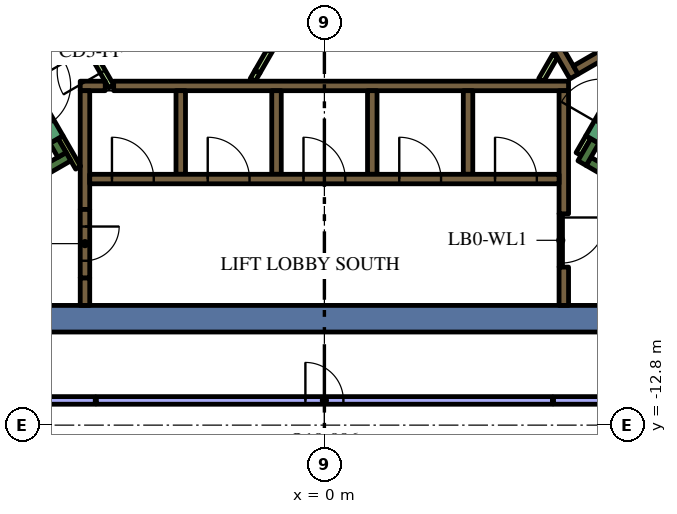
"""IFC4 building model, lengths in metres.
Left out: names, types, materials, properties, quantities, classifications, styles, units other than length and angle.
Written with IfcOpenShell. Run it as: python <this file> out.ifc"""

import sys

from ifc_helpers import new_model, si_unit, direction, frame, frame_2d, origin, place, context, subcontext, project, spatial, rectangle, extrude, element, fill, save


model = new_model("IFC4")
c1 = context("Model", 3, precision=1e-05, world=origin(), true_north=direction((0.0, 1.0)))
c2 = subcontext(c1, "Body", "Model", "MODEL_VIEW")
j1 = project(units=[si_unit("LENGTHUNIT", "METRE"), si_unit("PLANEANGLEUNIT", "RADIAN")], contexts=[c1])
p1 = place(None, origin())
s1 = spatial("IfcSite", under=j1, at=p1, CompositionType="ELEMENT")
p2 = place(p1, origin())
s2 = spatial("IfcBuilding", under=s1, at=p2, CompositionType="ELEMENT")
p3 = place(p2, frame((0.0, 0.0, 252.0)))
s3 = spatial("IfcBuildingStorey", under=s2, at=p3, CompositionType="ELEMENT", Elevation=252.0)
p4 = place(p3, frame((8.904, -10.0, 0.0), z_axis=(0.0, 0.0, 1.0), x_axis=(-1.0, 0.0, 0.0)))
e1 = element("IfcWall", 1, at=p4, inside=s3, PredefinedType="SOLIDWALL", context=c2, shape_type="SweptSolid", body=[
    extrude(rectangle(XDim=22.226, YDim=0.7, at=frame_2d((11.113, 0.0))), origin(), (0.0, 0.0, 1.0), 4.2),
])
p5 = place(p3, frame((12.84, -9.261, 0.0), z_axis=(0.0, 0.0, 1.0), x_axis=(-0.866013990052, 0.500019768644, 0.0)))
e2 = element("IfcWall", 2, at=p5, inside=s3, PredefinedType="SOLIDWALL", context=c2, shape_type="SweptSolid", body=[
    extrude(rectangle(XDim=6.8, YDim=0.25, at=frame_2d((3.4, 0.0))), origin(), (0.0, 0.0, 1.0), 4.2),
])
p6 = place(p3, frame((6.78, -5.906, 0.0), z_axis=(0.0, 0.0, 1.0), x_axis=(0.500223362819, 0.865896406789, 0.0)))
e3 = element("IfcWall", 3, at=p6, inside=s3, PredefinedType="SOLIDWALL", context=c2, shape_type="SweptSolid", body=[
    extrude(rectangle(XDim=0.675, YDim=0.25, at=frame_2d((0.337, 0.0))), origin(), (0.0, 0.0, 1.0), 4.2),
])
p7 = place(p3, frame((-12.84, -9.261, 0.0), z_axis=(0.0, 0.0, 1.0), x_axis=(0.866016039709, 0.500016218704, 0.0)))
e4 = element("IfcWall", 4, at=p7, inside=s3, PredefinedType="SOLIDWALL", context=c2, shape_type="SweptSolid", body=[
    extrude(rectangle(XDim=7.05, YDim=0.25, at=frame_2d((3.525, 0.0))), origin(), (0.0, 0.0, 1.0), 4.2),
])
p8 = place(p3, frame((-6.905, -5.69, 0.0), z_axis=(0.0, 0.0, 1.0), x_axis=(-0.500402024738, 0.865793170242, 0.0)))
e5 = element("IfcWall", 5, at=p8, inside=s3, PredefinedType="SOLIDWALL", context=c2, shape_type="SweptSolid", body=[
    extrude(rectangle(XDim=0.425, YDim=0.25, at=frame_2d((0.212, 0.0))), origin(), (0.0, 0.0, 1.0), 4.2),
])
p9 = place(p3, frame((-6.3, -8.925, 0.0), z_axis=(0.0, 0.0, 1.0), x_axis=(0.0, -1.0, 0.0)))
e6 = element("IfcWall", 6, at=p9, inside=s3, PredefinedType="SOLIDWALL", context=c2, shape_type="SweptSolid", body=[
    extrude(rectangle(XDim=0.725, YDim=0.25, at=frame_2d((0.363, 0.0))), origin(), (0.0, 0.0, 1.0), 4.2),
])
p10 = place(p3, frame((-5.545, -3.875, 0.0), z_axis=(0.0, 0.0, 1.0), x_axis=(1.0, 0.0, 0.0)))
e7 = element("IfcWall", 7, at=p10, inside=s3, PredefinedType="SOLIDWALL", context=c2, shape_type="SweptSolid", body=[
    extrude(rectangle(XDim=11.97, YDim=0.25, at=frame_2d((5.985, 0.0))), origin(), (0.0, 0.0, 1.0), 4.2),
])
p11 = place(p3, frame((-6.425, -3.875, 0.0), z_axis=(0.0, 0.0, 1.0), x_axis=(1.0, 0.0, 0.0)))
e8 = element("IfcWall", 8, at=p11, inside=s3, PredefinedType="SOLIDWALL", context=c2, shape_type="SweptSolid", body=[
    extrude(rectangle(XDim=0.658, YDim=0.25, at=frame_2d((0.329, 0.0))), origin(), (0.0, 0.0, 1.0), 4.2),
])
p12 = place(p3, frame((6.3, -7.24, 0.0), z_axis=(0.0, 0.0, 1.0), x_axis=(0.0, 1.0, 0.0)))
e9 = element("IfcWall", 9, at=p12, inside=s3, PredefinedType="SOLIDWALL", context=c2, shape_type="SweptSolid", body=[
    extrude(rectangle(XDim=3.24, YDim=0.25, at=frame_2d((1.62, 0.0))), origin(), (0.0, 0.0, 1.0), 4.2),
])
p13 = place(p3, frame((6.3, -9.65, 0.0), z_axis=(0.0, 0.0, 1.0), x_axis=(0.0, 1.0, 0.0)))
e10 = element("IfcWall", 10, at=p13, inside=s3, PredefinedType="SOLIDWALL", context=c2, shape_type="SweptSolid", body=[
    extrude(rectangle(XDim=1.008, YDim=0.25, at=frame_2d((0.504, 0.0))), origin(), (0.0, 0.0, 1.0), 4.2),
])
for number, where, z_axis, x_axis in (
    (11, (3.78, -4.0, 0.0), (0.0, 0.0, 1.0), (0.0, -1.0, 0.0)),
    (12, (1.26, -4.0, 0.0), (0.0, 0.0, 1.0), (0.0, -1.0, 0.0)),
    (13, (-1.26, -4.0, 0.0), (0.0, 0.0, 1.0), (0.0, -1.0, 0.0)),
    (14, (-3.78, -4.0, 0.0), (0.0, 0.0, 1.0), (0.0, -1.0, 0.0)),
):
    element("IfcWall", number, at=place(p3, frame(where, z_axis=z_axis, x_axis=x_axis)), inside=s3, PredefinedType="SOLIDWALL", context=c2, shape_type="SweptSolid", body=[
        extrude(rectangle(XDim=2.2, YDim=0.25, at=frame_2d((1.1, 0.0))), origin(), (0.0, 0.0, 1.0), 4.2),
    ])
p14 = place(p3, frame((-6.3, -7.125, 0.0), z_axis=(0.0, 0.0, 1.0), x_axis=(0.0, 1.0, 0.0)))
e15 = element("IfcWall", 15, at=p14, inside=s3, PredefinedType="SOLIDWALL", context=c2, shape_type="SweptSolid", body=[
    extrude(rectangle(XDim=3.125, YDim=0.25, at=frame_2d((1.562, 0.0))), origin(), (0.0, 0.0, 1.0), 4.2),
])
p15 = place(p3, frame((6.568, -3.627, 0.0), z_axis=(0.0, 0.0, 1.0), x_axis=(-0.499999455981, 0.866025717874, 0.0)))
e16 = element("IfcWall", 16, at=p15, inside=s3, PredefinedType="SOLIDWALL", context=c2, shape_type="SweptSolid", body=[
    extrude(rectangle(XDim=11.978, YDim=0.25, at=frame_2d((5.989, 0.0))), origin(), (0.0, 0.0, 1.0), 4.2),
])
p16 = place(p3, frame((6.614, -3.456, 0.0), z_axis=(0.0, 0.0, 1.0), x_axis=(0.866025089694, 0.500000544019, 0.0)))
e17 = element("IfcWall", 17, at=p16, inside=s3, PredefinedType="SOLIDWALL", context=c2, shape_type="SweptSolid", body=[
    extrude(rectangle(XDim=2.305, YDim=0.25, at=frame_2d((1.153, 0.0))), origin(), (0.0, 0.0, 1.0), 4.2),
])
p17 = place(p3, frame((-6.48, -6.027, 0.0), z_axis=(0.0, 0.0, 1.0), x_axis=(-0.499927229454, 0.866067413802, 0.0)))
e18 = element("IfcWall", 18, at=p17, inside=s3, PredefinedType="PARTITIONING", context=c2, shape_type="SweptSolid", body=[
    extrude(rectangle(XDim=0.929, YDim=0.15, at=frame_2d((0.464, 0.0))), origin(), (0.0, 0.0, 1.0), 4.2),
])
p18 = place(p3, frame((6.945, -5.222, 0.0), z_axis=(0.0, 0.0, 1.0), x_axis=(-0.499818422106, -0.866130212453, 0.0)))
e19 = element("IfcWall", 19, at=p18, inside=s3, PredefinedType="PARTITIONING", context=c2, shape_type="SweptSolid", body=[
    extrude(rectangle(XDim=0.514, YDim=0.15, at=frame_2d((0.257, 0.0))), origin(), (0.0, 0.0, 1.0), 3.4),
])
p19 = place(p3, frame((5.705, -3.718, 0.0), z_axis=(0.0, 0.0, 1.0), x_axis=(0.499962090823, 0.866047289552, 0.0)))
e20 = element("IfcWall", 20, at=p19, inside=s3, PredefinedType="PARTITIONING", context=c2, shape_type="SweptSolid", body=[
    extrude(rectangle(XDim=0.735, YDim=0.15, at=frame_2d((0.367, 0.0))), origin(), (0.0, 0.0, 1.0), 3.4),
])
p20 = place(p3, frame((-1.887, -3.718, 0.0), z_axis=(0.0, 0.0, 1.0), x_axis=(0.500165633897, 0.865929753888, 0.0)))
e21 = element("IfcWall", 21, at=p20, inside=s3, PredefinedType="PARTITIONING", context=c2, shape_type="SweptSolid", body=[
    extrude(rectangle(XDim=0.254, YDim=0.15, at=frame_2d((0.127, 0.0))), origin(), (0.0, 0.0, 1.0), 3.4),
])
p21 = place(p3, frame((-6.175, -6.325, 0.0), z_axis=(0.0, 0.0, 1.0), x_axis=(1.0, 0.0, 0.0)))
e22 = element("IfcWall", 22, at=p21, inside=s3, PredefinedType="SOLIDWALL", context=c2, shape_type="SweptSolid", body=[
    extrude(rectangle(XDim=12.35, YDim=0.25, at=frame_2d((6.175, 0.0))), origin(), (0.0, 0.0, 1.0), 4.2),
])
p22 = place(p21, frame((0.585, 0.0, 0.0)))
e23 = element("IfcOpeningElement", 23, at=p22, cuts=e22, PredefinedType="OPENING", context=c2, shape_type="SweptSolid", body=[
    extrude(rectangle(XDim=1.1, YDim=2.1, at=frame_2d((0.55, 1.05))), frame((0.0, 0.135, 0.0), z_axis=(0.0, -1.0, 0.0), x_axis=(1.0, 0.0, 0.0)), (0.0, 0.0, 1.0), 0.27),
])
p23 = place(p21, frame((3.105, 0.0, 0.0)))
e24 = element("IfcOpeningElement", 24, at=p23, cuts=e22, PredefinedType="OPENING", context=c2, shape_type="SweptSolid", body=[
    extrude(rectangle(XDim=1.1, YDim=2.1, at=frame_2d((0.55, 1.05))), frame((0.0, 0.135, 0.0), z_axis=(0.0, -1.0, 0.0), x_axis=(1.0, 0.0, 0.0)), (0.0, 0.0, 1.0), 0.27),
])
p24 = place(p21, frame((5.625, 0.0, 0.0)))
e25 = element("IfcOpeningElement", 25, at=p24, cuts=e22, PredefinedType="OPENING", context=c2, shape_type="SweptSolid", body=[
    extrude(rectangle(XDim=1.1, YDim=2.1, at=frame_2d((0.55, 1.05))), frame((0.0, 0.135, 0.0), z_axis=(0.0, -1.0, 0.0), x_axis=(1.0, 0.0, 0.0)), (0.0, 0.0, 1.0), 0.27),
])
p25 = place(p21, frame((8.145, 0.0, 0.0)))
e26 = element("IfcOpeningElement", 26, at=p25, cuts=e22, PredefinedType="OPENING", context=c2, shape_type="SweptSolid", body=[
    extrude(rectangle(XDim=1.1, YDim=2.1, at=frame_2d((0.55, 1.05))), frame((0.0, 0.135, 0.0), z_axis=(0.0, -1.0, 0.0), x_axis=(1.0, 0.0, 0.0)), (0.0, 0.0, 1.0), 0.27),
])
p26 = place(p21, frame((10.665, 0.0, 0.0)))
e27 = element("IfcOpeningElement", 27, at=p26, cuts=e22, PredefinedType="OPENING", context=c2, shape_type="SweptSolid", body=[
    extrude(rectangle(XDim=1.1, YDim=2.1, at=frame_2d((0.55, 1.05))), frame((0.0, 0.135, 0.0), z_axis=(0.0, -1.0, 0.0), x_axis=(1.0, 0.0, 0.0)), (0.0, 0.0, 1.0), 0.27),
])
p27 = place(p3, frame((7.053, -5.284, 0.0), z_axis=(0.0, 0.0, 1.0), x_axis=(0.500078061341, 0.865980330357, 0.0)))
e28 = element("IfcWall", 28, at=p27, inside=s3, PredefinedType="SOLIDWALL", context=c2, shape_type="SweptSolid", body=[
    extrude(rectangle(XDim=2.1, YDim=0.4, at=frame_2d((1.05, 0.0))), origin(), (0.0, 0.0, 1.0), 4.2),
])
p28 = place(p27, frame((0.45, 0.0, 0.0)))
e29 = element("IfcOpeningElement", 29, at=p28, cuts=e28, PredefinedType="OPENING", context=c2, shape_type="SweptSolid", body=[
    extrude(rectangle(XDim=1.2, YDim=2.1, at=frame_2d((0.6, 1.05))), frame((0.0, 0.21, 0.0), z_axis=(0.0, -1.0, 0.0), x_axis=(1.0, 0.0, 0.0)), (0.0, 0.0, 1.0), 0.42),
])
p29 = place(p3, frame((-8.103, -3.466, 0.0), z_axis=(0.0, 0.0, 1.0), x_axis=(0.500078061341, -0.865980330357, 0.0)))
e30 = element("IfcWall", 30, at=p29, inside=s3, PredefinedType="SOLIDWALL", context=c2, shape_type="SweptSolid", body=[
    extrude(rectangle(XDim=2.1, YDim=0.4, at=frame_2d((1.05, 0.0))), origin(), (0.0, 0.0, 1.0), 4.2),
])
p30 = place(p29, frame((0.45, 0.0, 0.0)))
e31 = element("IfcOpeningElement", 31, at=p30, cuts=e30, PredefinedType="OPENING", context=c2, shape_type="SweptSolid", body=[
    extrude(rectangle(XDim=1.2, YDim=2.1, at=frame_2d((0.6, 1.05))), frame((0.0, 0.21, 0.0), z_axis=(0.0, -1.0, 0.0), x_axis=(1.0, 0.0, 0.0)), (0.0, 0.0, 1.0), 0.42),
])
p31 = place(p3, frame((-6.3, -7.125, 0.0), z_axis=(0.0, 0.0, 1.0), x_axis=(0.0, -1.0, 0.0)))
e32 = element("IfcWall", 32, at=p31, inside=s3, PredefinedType="SOLIDWALL", context=c2, shape_type="SweptSolid", body=[
    extrude(rectangle(XDim=1.8, YDim=0.25, at=frame_2d((0.9, 0.0))), origin(), (0.0, 0.0, 1.0), 4.2),
])
p32 = place(p31, frame((0.45, 0.0, 0.0)))
e33 = element("IfcOpeningElement", 33, at=p32, cuts=e32, PredefinedType="OPENING", context=c2, shape_type="SweptSolid", body=[
    extrude(rectangle(XDim=0.9, YDim=2.1, at=frame_2d((0.45, 1.05))), frame((0.0, 0.135, 0.0), z_axis=(0.0, -1.0, 0.0), x_axis=(1.0, 0.0, 0.0)), (0.0, 0.0, 1.0), 0.27),
])
p33 = place(p3, frame((-1.76, -3.498, 0.0), z_axis=(0.0, 0.0, 1.0), x_axis=(0.499977374825, 0.866038466041, 0.0)))
e34 = element("IfcWall", 34, at=p33, inside=s3, PredefinedType="PARTITIONING", context=c2, shape_type="SweptSolid", body=[
    extrude(rectangle(XDim=2.1, YDim=0.15, at=frame_2d((1.05, 0.0))), origin(), (0.0, 0.0, 1.0), 3.4),
])
p34 = place(p33, frame((0.6, 0.0, 0.0)))
e35 = element("IfcOpeningElement", 35, at=p34, cuts=e34, PredefinedType="OPENING", context=c2, shape_type="SweptSolid", body=[
    extrude(rectangle(XDim=0.9, YDim=2.1, at=frame_2d((0.45, 1.05))), frame((0.0, 0.085, 0.0), z_axis=(0.0, -1.0, 0.0), x_axis=(1.0, 0.0, 0.0)), (0.0, 0.0, 1.0), 0.17),
])
p35 = place(p3, frame((-5.606, -3.89, 0.0), z_axis=(0.0, 0.0, 1.0), x_axis=(-0.500027713859, 0.866009402589, 0.0)))
e36 = element("IfcWall", 36, at=p35, inside=s3, PredefinedType="PARTITIONING", context=c2, shape_type="SweptSolid", body=[
    extrude(rectangle(XDim=2.1, YDim=0.15, at=frame_2d((1.05, 0.0))), origin(), (0.0, 0.0, 1.0), 3.4),
])
p36 = place(p35, frame((0.45, 0.0, 0.0)))
e37 = element("IfcOpeningElement", 37, at=p36, cuts=e36, PredefinedType="OPENING", context=c2, shape_type="SweptSolid", body=[
    extrude(rectangle(XDim=1.2, YDim=2.1, at=frame_2d((0.6, 1.05))), frame((0.0, 0.085, 0.0), z_axis=(0.0, -1.0, 0.0), x_axis=(1.0, 0.0, 0.0)), (0.0, 0.0, 1.0), 0.17),
])
p37 = place(p3, frame((6.22, -7.237, 0.0), z_axis=(0.0, 0.0, 1.0), x_axis=(0.0, -1.0, 0.0)))
e38 = element("IfcWall", 38, at=p37, inside=s3, PredefinedType="PARTITIONING", context=c2, shape_type="SweptSolid", body=[
    extrude(rectangle(XDim=1.4, YDim=0.09, at=frame_2d((0.7, 0.0))), origin(), (0.0, 0.0, 1.0), 3.4),
])
p38 = place(p37, frame((0.1, 0.0, 0.0)))
e39 = element("IfcOpeningElement", 39, at=p38, cuts=e38, PredefinedType="OPENING", context=c2, shape_type="SweptSolid", body=[
    extrude(rectangle(XDim=1.2, YDim=2.1, at=frame_2d((0.6, 1.05))), frame((0.0, 0.055, 0.0), z_axis=(0.0, -1.0, 0.0), x_axis=(1.0, 0.0, 0.0)), (0.0, 0.0, 1.0), 0.11),
])
p39 = place(p3, frame((-6.0, -12.15, 0.0), z_axis=(0.0, 0.0, 1.0), x_axis=(1.0, 0.0, 0.0)))
e40 = element("IfcWall", 40, at=p39, inside=s3, PredefinedType="PARTITIONING", context=c2, shape_type="SweptSolid", body=[
    extrude(rectangle(XDim=12.0, YDim=0.2, at=frame_2d((6.0, 0.0))), origin(), (0.0, 0.0, 1.0), 3.4),
])
p40 = place(p39, frame((5.5, 0.0, 0.0)))
e41 = element("IfcOpeningElement", 41, at=p40, cuts=e40, PredefinedType="OPENING", context=c2, shape_type="SweptSolid", body=[
    extrude(rectangle(XDim=1.0, YDim=2.1, at=frame_2d((0.5, 1.05))), frame((0.0, 0.11, 0.0), z_axis=(0.0, -1.0, 0.0), x_axis=(1.0, 0.0, 0.0)), (0.0, 0.0, 1.0), 0.22),
])
for number, where, z_axis, x_axis in (
    (42, (-14.347, -12.15, 0.0), (0.0, 0.0, 1.0), (1.0, 0.0, 0.0)),
    (43, (6.03, -12.15, 0.0), (0.0, 0.0, 1.0), (1.0, 0.0, 0.0)),
):
    element("IfcWall", number, at=place(p3, frame(where, z_axis=z_axis, x_axis=x_axis)), inside=s3, PredefinedType="PARTITIONING", context=c2, shape_type="SweptSolid", body=[
        extrude(rectangle(XDim=8.317, YDim=0.2, at=frame_2d((4.159, 0.0))), origin(), (0.0, 0.0, 1.0), 3.4),
    ])
p41 = place(p22, origin())
e44 = element("IfcDoor", 44, at=p41, inside=s3, OperationType="DOUBLE_DOOR_SLIDING", PredefinedType="DOOR", context=c2, shape_type="SweptSolid", body=[
    extrude(rectangle(XDim=1.1, YDim=2.1, at=frame_2d((0.55, 1.05))), frame((0.0, 0.025, 0.0), z_axis=(0.0, -1.0, 0.0), x_axis=(1.0, 0.0, 0.0)), (0.0, 0.0, 1.0), 0.05),
])
fill(e23, e44)
p42 = place(p23, origin())
e45 = element("IfcDoor", 45, at=p42, inside=s3, OperationType="DOUBLE_DOOR_SLIDING", PredefinedType="DOOR", context=c2, shape_type="SweptSolid", body=[
    extrude(rectangle(XDim=1.1, YDim=2.1, at=frame_2d((0.55, 1.05))), frame((0.0, 0.025, 0.0), z_axis=(0.0, -1.0, 0.0), x_axis=(1.0, 0.0, 0.0)), (0.0, 0.0, 1.0), 0.05),
])
fill(e24, e45)
p43 = place(p24, origin())
e46 = element("IfcDoor", 46, at=p43, inside=s3, OperationType="DOUBLE_DOOR_SLIDING", PredefinedType="DOOR", context=c2, shape_type="SweptSolid", body=[
    extrude(rectangle(XDim=1.1, YDim=2.1, at=frame_2d((0.55, 1.05))), frame((0.0, 0.025, 0.0), z_axis=(0.0, -1.0, 0.0), x_axis=(1.0, 0.0, 0.0)), (0.0, 0.0, 1.0), 0.05),
])
fill(e25, e46)
p44 = place(p25, origin())
e47 = element("IfcDoor", 47, at=p44, inside=s3, OperationType="DOUBLE_DOOR_SLIDING", PredefinedType="DOOR", context=c2, shape_type="SweptSolid", body=[
    extrude(rectangle(XDim=1.1, YDim=2.1, at=frame_2d((0.55, 1.05))), frame((0.0, 0.025, 0.0), z_axis=(0.0, -1.0, 0.0), x_axis=(1.0, 0.0, 0.0)), (0.0, 0.0, 1.0), 0.05),
])
fill(e26, e47)
p45 = place(p26, origin())
e48 = element("IfcDoor", 48, at=p45, inside=s3, OperationType="DOUBLE_DOOR_SLIDING", PredefinedType="DOOR", context=c2, shape_type="SweptSolid", body=[
    extrude(rectangle(XDim=1.1, YDim=2.1, at=frame_2d((0.55, 1.05))), frame((0.0, 0.025, 0.0), z_axis=(0.0, -1.0, 0.0), x_axis=(1.0, 0.0, 0.0)), (0.0, 0.0, 1.0), 0.05),
])
fill(e27, e48)
p46 = place(p32, origin())
e49 = element("IfcDoor", 49, at=p46, inside=s3, OperationType="SINGLE_SWING_LEFT", PredefinedType="DOOR", context=c2, shape_type="SweptSolid", body=[
    extrude(rectangle(XDim=0.9, YDim=2.1, at=frame_2d((0.45, 1.05))), frame((0.0, 0.025, 0.0), z_axis=(0.0, -1.0, 0.0), x_axis=(1.0, 0.0, 0.0)), (0.0, 0.0, 1.0), 0.05),
])
fill(e33, e49)
p47 = place(p36, origin())
e50 = element("IfcDoor", 50, at=p47, inside=s3, OperationType="SINGLE_SWING_LEFT", PredefinedType="DOOR", context=c2, shape_type="SweptSolid", body=[
    extrude(rectangle(XDim=1.2, YDim=2.1, at=frame_2d((0.6, 1.05))), frame((0.0, 0.025, 0.0), z_axis=(0.0, -1.0, 0.0), x_axis=(1.0, 0.0, 0.0)), (0.0, 0.0, 1.0), 0.05),
])
fill(e37, e50)
p48 = place(p38, origin())
e51 = element("IfcDoor", 51, at=p48, inside=s3, OperationType="SINGLE_SWING_LEFT", PredefinedType="DOOR", context=c2, shape_type="SweptSolid", body=[
    extrude(rectangle(XDim=1.2, YDim=2.1, at=frame_2d((0.6, 1.05))), frame((0.0, 0.025, 0.0), z_axis=(0.0, -1.0, 0.0), x_axis=(1.0, 0.0, 0.0)), (0.0, 0.0, 1.0), 0.05),
])
fill(e39, e51)
p49 = place(p40, origin())
e52 = element("IfcDoor", 52, at=p49, inside=s3, OperationType="SINGLE_SWING_RIGHT", PredefinedType="DOOR", context=c2, shape_type="SweptSolid", body=[
    extrude(rectangle(XDim=1.0, YDim=2.1, at=frame_2d((0.5, 1.05))), frame((0.0, 0.025, 0.0), z_axis=(0.0, -1.0, 0.0), x_axis=(1.0, 0.0, 0.0)), (0.0, 0.0, 1.0), 0.05),
])
fill(e41, e52)
save(model, sys.argv[1])
